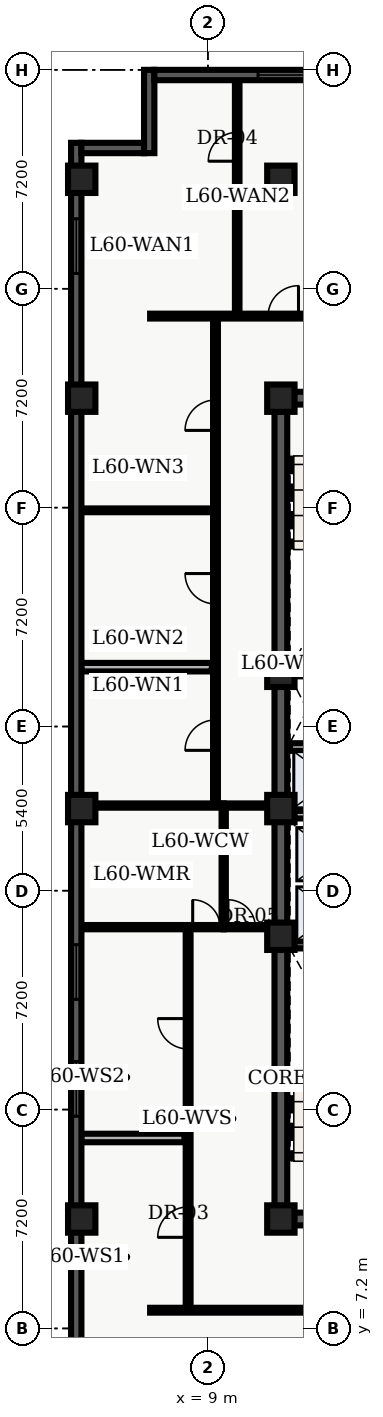
"""IFC4 building model, lengths in metres.
Left out: names, types, materials, properties, quantities, classifications, styles, units other than length and angle.
Written with IfcOpenShell. Run it as: python <this file> out.ifc"""

import sys

from ifc_helpers import new_model, entity, si_unit, converted_unit, direction, frame, origin_with_axes, origin_2d_with_axis, place, context, subcontext, project, spatial, polyline, rectangle, outline, extrude, element, fill, save


model = new_model("IFC4")
c1 = context("Model", 3, precision=1e-05, world=origin_with_axes(), true_north=direction((0.0, 1.0)))
c2 = subcontext(c1, "Body", "Model", "MODEL_VIEW")
j1 = project(units=[si_unit("LENGTHUNIT", "METRE"), converted_unit("PLANEANGLEUNIT", "DEGREE", entity("IfcPlaneAngleMeasure", 0.017), si_unit("PLANEANGLEUNIT", "RADIAN"), dimensions=[0, 0, 0, 0, 0, 0, 0])], contexts=[c1])
p1 = place(None, origin_with_axes())
s1 = spatial("IfcSite", under=j1, at=p1, CompositionType="ELEMENT")
p2 = place(p1, origin_with_axes())
s2 = spatial("IfcBuilding", under=s1, at=p2, CompositionType="ELEMENT")
p3 = place(p2, frame((0.0, 0.0, 244.2), z_axis=(0.0, 0.0, 1.0), x_axis=(1.0, 0.0, 0.0)))
s3 = spatial("IfcBuildingStorey", under=s2, at=p3, CompositionType="ELEMENT", Elevation=244.2)
p4 = place(p3, frame((11.4, 10.8, 0.0), z_axis=(0.0, 0.0, 1.0), x_axis=(0.0, 1.0, 0.0)))
e1 = element("IfcWall", 1, at=p4, inside=s3, PredefinedType="SHEAR", context=c2, shape_type="SweptSolid", body=[
    extrude(outline(polyline([(0.0, -0.21), (27.0, -0.21), (27.0, 0.21), (0.0, 0.21), (0.0, -0.21)])), origin_with_axes(), (0.0, 0.0, 1.0), 3.6),
])
p5 = place(p3, frame((11.4, 10.8, 0.0), z_axis=(0.0, 0.0, 1.0), x_axis=(1.0, 0.0, 0.0)))
e2 = element("IfcWall", 2, at=p5, inside=s3, PredefinedType="SHEAR", context=c2, shape_type="SweptSolid", body=[
    extrude(outline(polyline([(0.0, -0.21), (7.2, -0.21), (7.2, 0.21), (0.0, 0.21), (0.0, -0.21)])), origin_with_axes(), (0.0, 0.0, 1.0), 3.6),
])
p6 = place(p5, frame((2.625, 0.0, 0.0), z_axis=(0.0, 0.0, 1.0), x_axis=(1.0, 0.0, 0.0)))
e3 = element("IfcOpeningElement", 3, at=p6, cuts=e2, PredefinedType="OPENING", context=c2, shape_type="SweptSolid", body=[
    extrude(rectangle(XDim=1.05, YDim=0.44, at=origin_2d_with_axis()), origin_with_axes(), (0.0, 0.0, 1.0), 2.15),
])
p7 = place(p3, frame((11.4, 37.8, 0.0), z_axis=(0.0, 0.0, 1.0), x_axis=(1.0, 0.0, 0.0)))
e4 = element("IfcWall", 4, at=p7, inside=s3, PredefinedType="SHEAR", context=c2, shape_type="SweptSolid", body=[
    extrude(outline(polyline([(0.0, -0.21), (7.2, -0.21), (7.2, 0.21), (0.0, 0.21), (0.0, -0.21)])), origin_with_axes(), (0.0, 0.0, 1.0), 3.6),
])
p8 = place(p7, frame((2.625, 0.0, 0.0), z_axis=(0.0, 0.0, 1.0), x_axis=(1.0, 0.0, 0.0)))
e5 = element("IfcOpeningElement", 5, at=p8, cuts=e4, PredefinedType="OPENING", context=c2, shape_type="SweptSolid", body=[
    extrude(rectangle(XDim=1.05, YDim=0.44, at=origin_2d_with_axis()), origin_with_axes(), (0.0, 0.0, 1.0), 2.15),
])
for number, where, z_axis, x_axis in (
    (6, (11.61, 19.825, 0.0), (0.0, 0.0, 1.0), (1.0, 0.0, 0.0)),
    (7, (11.61, 28.775, 0.0), (0.0, 0.0, 1.0), (1.0, 0.0, 0.0)),
):
    element("IfcWall", number, at=place(p3, frame(where, z_axis=z_axis, x_axis=x_axis)), inside=s3, PredefinedType="SHEAR", context=c2, shape_type="SweptSolid", body=[
        extrude(outline(polyline([(0.0, -0.125), (6.78, -0.125), (6.78, 0.125), (0.0, 0.125), (0.0, -0.125)])), origin_with_axes(), (0.0, 0.0, 1.0), 3.6),
    ])
p9 = place(p3, frame((11.7, 24.1, 0.0), z_axis=(0.0, 0.0, 1.0), x_axis=(1.0, 0.0, 0.0)))
e8 = element("IfcWall", 8, at=p9, inside=s3, PredefinedType="SOLIDWALL", context=c2, shape_type="SweptSolid", body=[
    extrude(outline(polyline([(0.0, -0.125), (6.6, -0.125), (6.6, 0.125), (0.0, 0.125), (0.0, -0.125)])), origin_with_axes(), (0.0, 0.0, 1.0), 2.64),
])
p10 = place(p9, frame((3.75, 0.0, 0.0), z_axis=(0.0, 0.0, 1.0), x_axis=(1.0, 0.0, 0.0)))
e9 = element("IfcOpeningElement", 9, at=p10, cuts=e8, PredefinedType="OPENING", context=c2, shape_type="SweptSolid", body=[
    extrude(rectangle(XDim=0.9, YDim=0.27, at=origin_2d_with_axis()), origin_with_axes(), (0.0, 0.0, 1.0), 2.15),
])
p11 = place(p3, frame((11.7, 26.325, 0.0), z_axis=(0.0, 0.0, 1.0), x_axis=(1.0, 0.0, 0.0)))
e10 = element("IfcWall", 10, at=p11, inside=s3, PredefinedType="SOLIDWALL", context=c2, shape_type="SweptSolid", body=[
    extrude(outline(polyline([(0.0, -0.125), (6.6, -0.125), (6.6, 0.125), (0.0, 0.125), (0.0, -0.125)])), origin_with_axes(), (0.0, 0.0, 1.0), 2.64),
])
p12 = place(p11, frame((3.5, 0.0, 0.0), z_axis=(0.0, 0.0, 1.0), x_axis=(1.0, 0.0, 0.0)))
e11 = element("IfcOpeningElement", 11, at=p12, cuts=e10, PredefinedType="OPENING", context=c2, shape_type="SweptSolid", body=[
    extrude(rectangle(XDim=0.9, YDim=0.27, at=origin_2d_with_axis()), origin_with_axes(), (0.0, 0.0, 1.0), 2.15),
])
for number, where, z_axis, x_axis in (
    (12, (11.4, 10.8, 0.0), (0.0, 0.0, 1.0), (1.0, 0.0, 0.0)),
    (13, (11.4, 20.1, 0.0), (0.0, 0.0, 1.0), (1.0, 0.0, 0.0)),
    (14, (11.4, 24.3, 0.0), (0.0, 0.0, 1.0), (1.0, 0.0, 0.0)),
    (15, (11.4, 28.75, 0.0), (0.0, 0.0, 1.0), (1.0, 0.0, 0.0)),
    (16, (11.4, 37.8, 0.0), (0.0, 0.0, 1.0), (1.0, 0.0, 0.0)),
    (17, (11.4, 45.0, 0.0), (0.0, 0.0, 1.0), (1.0, 0.0, 0.0)),
    (18, (4.85, 10.8, 0.0), (0.0, 0.0, 1.0), (1.0, 0.0, 0.0)),
    (19, (4.85, 24.3, 0.0), (0.0, 0.0, 1.0), (1.0, 0.0, 0.0)),
    (20, (4.85, 37.8, 0.0), (0.0, 0.0, 1.0), (1.0, 0.0, 0.0)),
    (21, (4.85, 45.0, 0.0), (0.0, 0.0, 1.0), (1.0, 0.0, 0.0)),
):
    element("IfcColumn", number, at=place(p3, frame(where, z_axis=z_axis, x_axis=x_axis)), inside=s3, PredefinedType="COLUMN", context=c2, shape_type="SweptSolid", body=[
        extrude(rectangle(XDim=0.9, YDim=0.9, at=origin_2d_with_axis()), origin_with_axes(), (0.0, 0.0, 1.0), 3.9),
    ])
p13 = place(p3, frame((9.52, 20.4, 0.0), z_axis=(0.0, 0.0, 1.0), x_axis=(0.0, 1.0, 0.0)))
e22 = element("IfcWall", 22, at=p13, inside=s3, PredefinedType="PARTITIONING", context=c2, shape_type="SweptSolid", body=[
    extrude(outline(polyline([(0.0, -0.07), (4.0, -0.07), (4.0, 0.07), (0.0, 0.07), (0.0, -0.07)])), origin_with_axes(), (0.0, 0.0, 1.0), 2.64),
])
p14 = place(p3, frame((9.52, 20.4, 0.0), z_axis=(0.0, 0.0, 1.0), x_axis=(1.0, 0.0, 0.0)))
e23 = element("IfcWall", 23, at=p14, inside=s3, PredefinedType="PARTITIONING", context=c2, shape_type="SweptSolid", body=[
    extrude(outline(polyline([(0.0, -0.07), (1.58, -0.07), (1.58, 0.07), (0.0, 0.07), (0.0, -0.07)])), origin_with_axes(), (0.0, 0.0, 1.0), 2.64),
])
p15 = place(p14, frame((0.59, 0.0, 0.0), z_axis=(0.0, 0.0, 1.0), x_axis=(1.0, 0.0, 0.0)))
e24 = element("IfcOpeningElement", 24, at=p15, cuts=e23, PredefinedType="OPENING", context=c2, shape_type="SweptSolid", body=[
    extrude(rectangle(XDim=0.9, YDim=0.16, at=origin_2d_with_axis()), origin_with_axes(), (0.0, 0.0, 1.0), 2.15),
])
p16 = place(p3, frame((9.52, 24.4, 0.0), z_axis=(0.0, 0.0, 1.0), x_axis=(1.0, 0.0, 0.0)))
e25 = element("IfcWall", 25, at=p16, inside=s3, PredefinedType="PARTITIONING", context=c2, shape_type="SweptSolid", body=[
    extrude(outline(polyline([(0.0, -0.07), (1.58, -0.07), (1.58, 0.07), (0.0, 0.07), (0.0, -0.07)])), origin_with_axes(), (0.0, 0.0, 1.0), 2.64),
])
p17 = place(p3, frame((7.1, 7.8, 0.0), z_axis=(0.0, 0.0, 1.0), x_axis=(1.0, 0.0, 0.0)))
e26 = element("IfcWall", 26, at=p17, inside=s3, PredefinedType="PARTITIONING", context=c2, shape_type="SweptSolid", body=[
    extrude(outline(polyline([(0.0, -0.08), (13.2, -0.08), (13.2, 0.08), (0.0, 0.08), (0.0, -0.08)])), origin_with_axes(), (0.0, 0.0, 1.0), 2.64),
])
p18 = place(p17, frame((6.57, 0.0, 0.0), z_axis=(0.0, 0.0, 1.0), x_axis=(1.0, 0.0, 0.0)))
e27 = element("IfcOpeningElement", 27, at=p18, cuts=e26, PredefinedType="OPENING", context=c2, shape_type="SweptSolid", body=[
    extrude(rectangle(XDim=1.2, YDim=0.18, at=origin_2d_with_axis()), origin_with_axes(), (0.0, 0.0, 1.0), 2.2),
])
p19 = place(p3, frame((7.1, 40.5, 0.0), z_axis=(0.0, 0.0, 1.0), x_axis=(1.0, 0.0, 0.0)))
e28 = element("IfcWall", 28, at=p19, inside=s3, PredefinedType="PARTITIONING", context=c2, shape_type="SweptSolid", body=[
    extrude(outline(polyline([(0.0, -0.08), (24.965, -0.08), (24.965, 0.08), (0.0, 0.08), (0.0, -0.08)])), origin_with_axes(), (0.0, 0.0, 1.0), 2.64),
])
p20 = place(p19, frame((4.38, 0.0, 0.0), z_axis=(0.0, 0.0, 1.0), x_axis=(1.0, 0.0, 0.0)))
e29 = element("IfcOpeningElement", 29, at=p20, cuts=e28, PredefinedType="OPENING", context=c2, shape_type="SweptSolid", body=[
    extrude(rectangle(XDim=1.0, YDim=0.18, at=origin_2d_with_axis()), origin_with_axes(), (0.0, 0.0, 1.0), 2.15),
])
p21 = place(p19, frame((7.566, 0.0, 0.0), z_axis=(0.0, 0.0, 1.0), x_axis=(1.0, 0.0, 0.0)))
e30 = element("IfcOpeningElement", 30, at=p21, cuts=e28, PredefinedType="OPENING", context=c2, shape_type="SweptSolid", body=[
    extrude(rectangle(XDim=1.0, YDim=0.18, at=origin_2d_with_axis()), origin_with_axes(), (0.0, 0.0, 1.0), 2.15),
])
p22 = place(p19, frame((11.129, 0.0, 0.0), z_axis=(0.0, 0.0, 1.0), x_axis=(1.0, 0.0, 0.0)))
e31 = element("IfcOpeningElement", 31, at=p22, cuts=e28, PredefinedType="OPENING", context=c2, shape_type="SweptSolid", body=[
    extrude(rectangle(XDim=1.0, YDim=0.18, at=origin_2d_with_axis()), origin_with_axes(), (0.0, 0.0, 1.0), 2.15),
])
p23 = place(p3, frame((8.35, 7.8, 0.0), z_axis=(0.0, 0.0, 1.0), x_axis=(0.0, 1.0, 0.0)))
e32 = element("IfcWall", 32, at=p23, inside=s3, PredefinedType="PARTITIONING", context=c2, shape_type="SweptSolid", body=[
    extrude(outline(polyline([(0.0, -0.08), (12.6, -0.08), (12.6, 0.08), (0.0, 0.08), (0.0, -0.08)])), origin_with_axes(), (0.0, 0.0, 1.0), 2.64),
])
p24 = place(p23, frame((2.897, 0.0, 0.0), z_axis=(0.0, 0.0, 1.0), x_axis=(1.0, 0.0, 0.0)))
e33 = element("IfcOpeningElement", 33, at=p24, cuts=e32, PredefinedType="OPENING", context=c2, shape_type="SweptSolid", body=[
    extrude(rectangle(XDim=1.0, YDim=0.18, at=origin_2d_with_axis()), origin_with_axes(), (0.0, 0.0, 1.0), 2.15),
])
p25 = place(p23, frame((9.092, 0.0, 0.0), z_axis=(0.0, 0.0, 1.0), x_axis=(1.0, 0.0, 0.0)))
e34 = element("IfcOpeningElement", 34, at=p25, cuts=e32, PredefinedType="OPENING", context=c2, shape_type="SweptSolid", body=[
    extrude(rectangle(XDim=1.0, YDim=0.18, at=origin_2d_with_axis()), origin_with_axes(), (0.0, 0.0, 1.0), 2.15),
])
p26 = place(p3, frame((9.25, 24.4, 0.0), z_axis=(0.0, 0.0, 1.0), x_axis=(0.0, 1.0, 0.0)))
e35 = element("IfcWall", 35, at=p26, inside=s3, PredefinedType="PARTITIONING", context=c2, shape_type="SweptSolid", body=[
    extrude(outline(polyline([(0.0, -0.08), (16.1, -0.08), (16.1, 0.08), (0.0, 0.08), (0.0, -0.08)])), origin_with_axes(), (0.0, 0.0, 1.0), 2.64),
])
p27 = place(p26, frame((2.316, 0.0, 0.0), z_axis=(0.0, 0.0, 1.0), x_axis=(1.0, 0.0, 0.0)))
e36 = element("IfcOpeningElement", 36, at=p27, cuts=e35, PredefinedType="OPENING", context=c2, shape_type="SweptSolid", body=[
    extrude(rectangle(XDim=1.0, YDim=0.18, at=origin_2d_with_axis()), origin_with_axes(), (0.0, 0.0, 1.0), 2.15),
])
p28 = place(p26, frame((7.131, 0.0, 0.0), z_axis=(0.0, 0.0, 1.0), x_axis=(1.0, 0.0, 0.0)))
e37 = element("IfcOpeningElement", 37, at=p28, cuts=e35, PredefinedType="OPENING", context=c2, shape_type="SweptSolid", body=[
    extrude(rectangle(XDim=1.0, YDim=0.18, at=origin_2d_with_axis()), origin_with_axes(), (0.0, 0.0, 1.0), 2.15),
])
p29 = place(p26, frame((12.841, 0.0, 0.0), z_axis=(0.0, 0.0, 1.0), x_axis=(1.0, 0.0, 0.0)))
e38 = element("IfcOpeningElement", 38, at=p29, cuts=e35, PredefinedType="OPENING", context=c2, shape_type="SweptSolid", body=[
    extrude(rectangle(XDim=1.0, YDim=0.18, at=origin_2d_with_axis()), origin_with_axes(), (0.0, 0.0, 1.0), 2.15),
])
p30 = place(p3, frame((4.835, 20.4, 0.0), z_axis=(0.0, 0.0, 1.0), x_axis=(1.0, 0.0, 0.0)))
e39 = element("IfcWall", 39, at=p30, inside=s3, PredefinedType="PARTITIONING", context=c2, shape_type="SweptSolid", body=[
    extrude(outline(polyline([(0.0, -0.07), (4.685, -0.07), (4.685, 0.07), (0.0, 0.07), (0.0, -0.07)])), origin_with_axes(), (0.0, 0.0, 1.0), 2.64),
])
p31 = place(p30, frame((4.115, 0.0, 0.0), z_axis=(0.0, 0.0, 1.0), x_axis=(1.0, 0.0, 0.0)))
e40 = element("IfcOpeningElement", 40, at=p31, cuts=e39, PredefinedType="OPENING", context=c2, shape_type="SweptSolid", body=[
    extrude(rectangle(XDim=0.9, YDim=0.16, at=origin_2d_with_axis()), origin_with_axes(), (0.0, 0.0, 1.0), 2.15),
])
p32 = place(p3, frame((4.835, 24.4, 0.0), z_axis=(0.0, 0.0, 1.0), x_axis=(1.0, 0.0, 0.0)))
e41 = element("IfcWall", 41, at=p32, inside=s3, PredefinedType="PARTITIONING", context=c2, shape_type="SweptSolid", body=[
    extrude(outline(polyline([(0.0, -0.07), (4.685, -0.07), (4.685, 0.07), (0.0, 0.07), (0.0, -0.07)])), origin_with_axes(), (0.0, 0.0, 1.0), 2.64),
])
p33 = place(p3, frame((4.835, 13.465, 0.0), z_axis=(0.0, 0.0, 1.0), x_axis=(1.0, 0.0, 0.0)))
e42 = element("IfcWall", 42, at=p33, inside=s3, PredefinedType="PARTITIONING", context=c2, shape_type="SweptSolid", body=[
    extrude(outline(polyline([(0.0, -0.14), (3.395, -0.14), (3.395, 0.14), (0.0, 0.14), (0.0, -0.14)])), origin_with_axes(), (0.0, 0.0, 1.0), 2.64),
])
p34 = place(p3, frame((4.835, 28.952, 0.0), z_axis=(0.0, 0.0, 1.0), x_axis=(1.0, 0.0, 0.0)))
e43 = element("IfcWall", 43, at=p34, inside=s3, PredefinedType="PARTITIONING", context=c2, shape_type="SweptSolid", body=[
    extrude(outline(polyline([(0.0, -0.14), (4.295, -0.14), (4.295, 0.14), (0.0, 0.14), (0.0, -0.14)])), origin_with_axes(), (0.0, 0.0, 1.0), 2.64),
])
p35 = place(p3, frame((4.835, 34.111, 0.0), z_axis=(0.0, 0.0, 1.0), x_axis=(1.0, 0.0, 0.0)))
e44 = element("IfcWall", 44, at=p35, inside=s3, PredefinedType="PARTITIONING", context=c2, shape_type="SweptSolid", body=[
    extrude(outline(polyline([(0.0, -0.062), (4.295, -0.062), (4.295, 0.062), (0.0, 0.062), (0.0, -0.062)])), origin_with_axes(), (0.0, 0.0, 1.0), 2.64),
])
p36 = place(p3, frame((9.964, 40.6, 0.0), z_axis=(0.0, 0.0, 1.0), x_axis=(0.0, 1.0, 0.0)))
e45 = element("IfcWall", 45, at=p36, inside=s3, PredefinedType="PARTITIONING", context=c2, shape_type="SweptSolid", body=[
    extrude(outline(polyline([(0.0, -0.075), (7.665, -0.075), (7.665, 0.075), (0.0, 0.075), (0.0, -0.075)])), origin_with_axes(), (0.0, 0.0, 1.0), 2.64),
])
p37 = place(p36, frame((5.47, 0.0, 0.0), z_axis=(0.0, 0.0, 1.0), x_axis=(1.0, 0.0, 0.0)))
e46 = element("IfcOpeningElement", 46, at=p37, cuts=e45, PredefinedType="OPENING", context=c2, shape_type="SweptSolid", body=[
    extrude(rectangle(XDim=0.95, YDim=0.17, at=origin_2d_with_axis()), origin_with_axes(), (0.0, 0.0, 1.0), 2.15),
])
p38 = place(p3, frame((4.67, 2.74, 0.0), z_axis=(0.0, 0.0, 1.0), x_axis=(0.0, 1.0, 0.0)))
e47 = element("IfcWall", 47, at=p38, inside=s3, PredefinedType="SOLIDWALL", context=c2, shape_type="SweptSolid", body=[
    extrude(outline(polyline([(0.0, -0.17), (43.46, -0.17), (43.46, 0.17), (0.0, 0.17), (0.0, -0.17)])), origin_with_axes(), (0.0, 0.0, 1.0), 3.6),
])
p39 = place(p38, frame((2.948, 0.0, 0.45), z_axis=(0.0, 0.0, 1.0), x_axis=(1.0, 0.0, 0.0)))
e48 = element("IfcOpeningElement", 48, at=p39, cuts=e47, PredefinedType="OPENING", context=c2, shape_type="SweptSolid", body=[
    extrude(rectangle(XDim=1.8, YDim=0.36, at=origin_2d_with_axis()), origin_with_axes(), (0.0, 0.0, 1.0), 2.1),
])
p40 = place(p38, frame((12.339, 0.0, 0.45), z_axis=(0.0, 0.0, 1.0), x_axis=(1.0, 0.0, 0.0)))
e49 = element("IfcOpeningElement", 49, at=p40, cuts=e47, PredefinedType="OPENING", context=c2, shape_type="SweptSolid", body=[
    extrude(rectangle(XDim=1.8, YDim=0.36, at=origin_2d_with_axis()), origin_with_axes(), (0.0, 0.0, 1.0), 2.1),
])
p41 = place(p38, frame((16.184, 0.0, 0.45), z_axis=(0.0, 0.0, 1.0), x_axis=(1.0, 0.0, 0.0)))
e50 = element("IfcOpeningElement", 50, at=p41, cuts=e47, PredefinedType="OPENING", context=c2, shape_type="SweptSolid", body=[
    extrude(rectangle(XDim=1.8, YDim=0.36, at=origin_2d_with_axis()), origin_with_axes(), (0.0, 0.0, 1.0), 2.1),
])
p42 = place(p38, frame((40.062, 0.0, 0.45), z_axis=(0.0, 0.0, 1.0), x_axis=(1.0, 0.0, 0.0)))
e51 = element("IfcOpeningElement", 51, at=p42, cuts=e47, PredefinedType="OPENING", context=c2, shape_type="SweptSolid", body=[
    extrude(rectangle(XDim=1.8, YDim=0.36, at=origin_2d_with_axis()), origin_with_axes(), (0.0, 0.0, 1.0), 2.1),
])
p43 = place(p3, frame((4.84, 46.03, 0.0), z_axis=(0.0, 0.0, 1.0), x_axis=(1.0, 0.0, 0.0)))
e52 = element("IfcWall", 52, at=p43, inside=s3, PredefinedType="SOLIDWALL", context=c2, shape_type="SweptSolid", body=[
    extrude(outline(polyline([(0.0, -0.17), (2.06, -0.17), (2.06, 0.17), (0.0, 0.17), (0.0, -0.17)])), origin_with_axes(), (0.0, 0.0, 1.0), 3.6),
])
p44 = place(p3, frame((7.07, 45.86, 0.0), z_axis=(0.0, 0.0, 1.0), x_axis=(0.0, 1.0, 0.0)))
e53 = element("IfcWall", 53, at=p44, inside=s3, PredefinedType="SOLIDWALL", context=c2, shape_type="SweptSolid", body=[
    extrude(outline(polyline([(0.0, -0.17), (2.74, -0.17), (2.74, 0.17), (0.0, 0.17), (0.0, -0.17)])), origin_with_axes(), (0.0, 0.0, 1.0), 3.6),
])
p45 = place(p3, frame((7.24, 48.43, 0.0), z_axis=(0.0, 0.0, 1.0), x_axis=(1.0, 0.0, 0.0)))
e54 = element("IfcWall", 54, at=p45, inside=s3, PredefinedType="SOLIDWALL", context=c2, shape_type="SweptSolid", body=[
    extrude(outline(polyline([(0.0, -0.17), (18.36, -0.17), (18.36, 0.17), (0.0, 0.17), (0.0, -0.17)])), origin_with_axes(), (0.0, 0.0, 1.0), 3.6),
])
p46 = place(p45, frame((4.31, 0.0, 0.45), z_axis=(0.0, 0.0, 1.0), x_axis=(1.0, 0.0, 0.0)))
e55 = element("IfcOpeningElement", 55, at=p46, cuts=e54, PredefinedType="OPENING", context=c2, shape_type="SweptSolid", body=[
    extrude(rectangle(XDim=1.8, YDim=0.36, at=origin_2d_with_axis()), origin_with_axes(), (0.0, 0.0, 1.0), 2.1),
])
p47 = place(p45, frame((14.9, 0.0, 0.45), z_axis=(0.0, 0.0, 1.0), x_axis=(1.0, 0.0, 0.0)))
e56 = element("IfcOpeningElement", 56, at=p47, cuts=e54, PredefinedType="OPENING", context=c2, shape_type="SweptSolid", body=[
    extrude(rectangle(XDim=1.8, YDim=0.36, at=origin_2d_with_axis()), origin_with_axes(), (0.0, 0.0, 1.0), 2.1),
])
p48 = place(p14, frame((0.59, 0.0, 0.0), z_axis=(0.0, 0.0, 1.0), x_axis=(1.0, 0.0, 0.0)))
e57 = element("IfcDoor", 57, at=p48, inside=s3, OperationType="SINGLE_SWING_LEFT", PredefinedType="DOOR", context=c2, shape_type="SweptSolid", body=[
    extrude(rectangle(XDim=0.9, YDim=0.084, at=origin_2d_with_axis()), origin_with_axes(), (0.0, 0.0, 1.0), 2.15),
])
fill(e24, e57)
p49 = place(p30, frame((4.115, 0.0, 0.0), z_axis=(0.0, 0.0, 1.0), x_axis=(1.0, 0.0, 0.0)))
e58 = element("IfcDoor", 58, at=p49, inside=s3, OperationType="SINGLE_SWING_LEFT", PredefinedType="DOOR", context=c2, shape_type="SweptSolid", body=[
    extrude(rectangle(XDim=0.9, YDim=0.084, at=origin_2d_with_axis()), origin_with_axes(), (0.0, 0.0, 1.0), 2.15),
])
fill(e40, e58)
p50 = place(p23, frame((2.897, 0.0, 0.0), z_axis=(0.0, 0.0, 1.0), x_axis=(1.0, 0.0, 0.0)))
e59 = element("IfcDoor", 59, at=p50, inside=s3, OperationType="SINGLE_SWING_LEFT", PredefinedType="DOOR", context=c2, shape_type="SweptSolid", body=[
    extrude(rectangle(XDim=1.0, YDim=0.09, at=origin_2d_with_axis()), origin_with_axes(), (0.0, 0.0, 1.0), 2.15),
])
fill(e33, e59)
p51 = place(p23, frame((9.092, 0.0, 0.0), z_axis=(0.0, 0.0, 1.0), x_axis=(1.0, 0.0, 0.0)))
e60 = element("IfcDoor", 60, at=p51, inside=s3, OperationType="SINGLE_SWING_RIGHT", PredefinedType="DOOR", context=c2, shape_type="SweptSolid", body=[
    extrude(rectangle(XDim=1.0, YDim=0.09, at=origin_2d_with_axis()), origin_with_axes(), (0.0, 0.0, 1.0), 2.15),
])
fill(e34, e60)
p52 = place(p26, frame((2.316, 0.0, 0.0), z_axis=(0.0, 0.0, 1.0), x_axis=(1.0, 0.0, 0.0)))
e61 = element("IfcDoor", 61, at=p52, inside=s3, OperationType="SINGLE_SWING_LEFT", PredefinedType="DOOR", context=c2, shape_type="SweptSolid", body=[
    extrude(rectangle(XDim=1.0, YDim=0.09, at=origin_2d_with_axis()), origin_with_axes(), (0.0, 0.0, 1.0), 2.15),
])
fill(e36, e61)
p53 = place(p26, frame((7.131, 0.0, 0.0), z_axis=(0.0, 0.0, 1.0), x_axis=(1.0, 0.0, 0.0)))
e62 = element("IfcDoor", 62, at=p53, inside=s3, OperationType="SINGLE_SWING_RIGHT", PredefinedType="DOOR", context=c2, shape_type="SweptSolid", body=[
    extrude(rectangle(XDim=1.0, YDim=0.09, at=origin_2d_with_axis()), origin_with_axes(), (0.0, 0.0, 1.0), 2.15),
])
fill(e37, e62)
p54 = place(p26, frame((12.841, 0.0, 0.0), z_axis=(0.0, 0.0, 1.0), x_axis=(1.0, 0.0, 0.0)))
e63 = element("IfcDoor", 63, at=p54, inside=s3, OperationType="SINGLE_SWING_LEFT", PredefinedType="DOOR", context=c2, shape_type="SweptSolid", body=[
    extrude(rectangle(XDim=1.0, YDim=0.09, at=origin_2d_with_axis()), origin_with_axes(), (0.0, 0.0, 1.0), 2.15),
])
fill(e38, e63)
p55 = place(p36, frame((5.47, 0.0, 0.0), z_axis=(0.0, 0.0, 1.0), x_axis=(1.0, 0.0, 0.0)))
e64 = element("IfcDoor", 64, at=p55, inside=s3, OperationType="SINGLE_SWING_LEFT", PredefinedType="DOOR", context=c2, shape_type="SweptSolid", body=[
    extrude(rectangle(XDim=0.95, YDim=0.09, at=origin_2d_with_axis()), origin_with_axes(), (0.0, 0.0, 1.0), 2.15),
])
fill(e46, e64)
p56 = place(p19, frame((4.38, 0.0, 0.0), z_axis=(0.0, 0.0, 1.0), x_axis=(1.0, 0.0, 0.0)))
e65 = element("IfcDoor", 65, at=p56, inside=s3, OperationType="SINGLE_SWING_RIGHT", PredefinedType="DOOR", context=c2, shape_type="SweptSolid", body=[
    extrude(rectangle(XDim=1.0, YDim=0.09, at=origin_2d_with_axis()), origin_with_axes(), (0.0, 0.0, 1.0), 2.15),
])
fill(e29, e65)
p57 = place(p38, frame((12.339, 0.0, 0.45), z_axis=(0.0, 0.0, 1.0), x_axis=(1.0, 0.0, 0.0)))
e66 = element("IfcWindow", 66, at=p57, inside=s3, PredefinedType="WINDOW", context=c2, shape_type="SweptSolid", body=[
    extrude(rectangle(XDim=1.8, YDim=0.09, at=origin_2d_with_axis()), origin_with_axes(), (0.0, 0.0, 1.0), 2.1),
])
fill(e49, e66)
p58 = place(p38, frame((16.184, 0.0, 0.45), z_axis=(0.0, 0.0, 1.0), x_axis=(1.0, 0.0, 0.0)))
e67 = element("IfcWindow", 67, at=p58, inside=s3, PredefinedType="WINDOW", context=c2, shape_type="SweptSolid", body=[
    extrude(rectangle(XDim=1.8, YDim=0.09, at=origin_2d_with_axis()), origin_with_axes(), (0.0, 0.0, 1.0), 2.1),
])
fill(e50, e67)
p59 = place(p38, frame((40.062, 0.0, 0.45), z_axis=(0.0, 0.0, 1.0), x_axis=(1.0, 0.0, 0.0)))
e68 = element("IfcWindow", 68, at=p59, inside=s3, PredefinedType="WINDOW", context=c2, shape_type="SweptSolid", body=[
    extrude(rectangle(XDim=1.8, YDim=0.09, at=origin_2d_with_axis()), origin_with_axes(), (0.0, 0.0, 1.0), 2.1),
])
fill(e51, e68)
p60 = place(p45, frame((4.31, 0.0, 0.45), z_axis=(0.0, 0.0, 1.0), x_axis=(1.0, 0.0, 0.0)))
e69 = element("IfcWindow", 69, at=p60, inside=s3, PredefinedType="WINDOW", context=c2, shape_type="SweptSolid", body=[
    extrude(rectangle(XDim=1.8, YDim=0.09, at=origin_2d_with_axis()), origin_with_axes(), (0.0, 0.0, 1.0), 2.1),
])
fill(e55, e69)
save(model, sys.argv[1])
